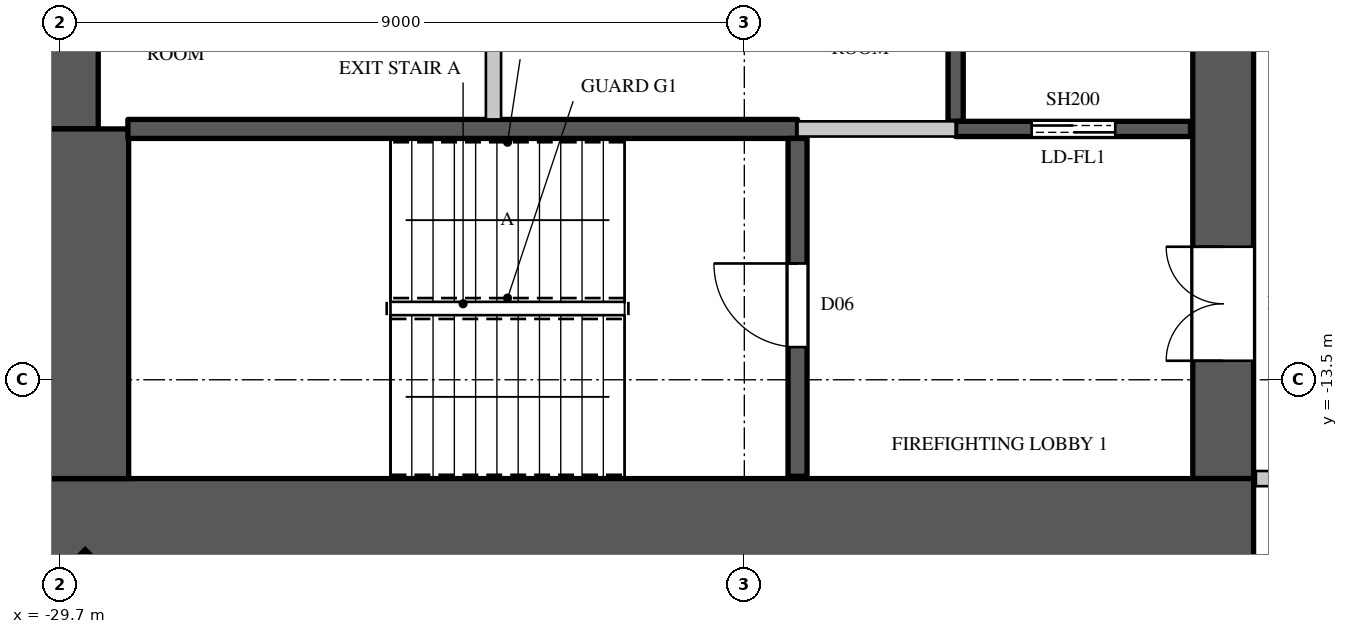
"""IFC4 building model, lengths in metres.
Left out: names, types, materials, properties, quantities, classifications, styles, units other than length and angle.
Written with IfcOpenShell. Run it as: python <this file> out.ifc"""

import sys

from ifc_helpers import new_model, si_unit, direction, frame, frame_2d, origin, origin_2d, place, context, subcontext, project, spatial, rectangle, extrude, element, fill, save


model = new_model("IFC4")
c1 = context("Model", 3, precision=1e-05, world=origin(), true_north=direction((0.0, 1.0)))
c2 = subcontext(c1, "Body", "Model", "MODEL_VIEW")
j1 = project(units=[si_unit("LENGTHUNIT", "METRE"), si_unit("PLANEANGLEUNIT", "RADIAN")], contexts=[c1])
p1 = place(None, origin())
s1 = spatial("IfcSite", under=j1, at=p1, CompositionType="ELEMENT")
p2 = place(p1, origin())
s2 = spatial("IfcBuilding", under=s1, at=p2, CompositionType="ELEMENT")
p3 = place(p2, frame((0.0, 0.0, 185.1)))
s3 = spatial("IfcBuildingStorey", under=s2, at=p3, CompositionType="ELEMENT", Elevation=185.1)
p4 = place(p3, frame((-29.443, -16.443, 0.0), z_axis=(0.0, 0.0, 1.0), x_axis=(0.707106781187, -0.707106781187, 0.0)))
e1 = element("IfcColumn", 1, at=p4, inside=s3, PredefinedType="COLUMN", context=c2, shape_type="SweptSolid", body=[
    extrude(rectangle(XDim=0.9, YDim=1.1, at=origin_2d()), origin(), (0.0, 0.0, 1.0), 4.1),
])
p5 = place(p3, frame((-30.0, -15.4, 0.0), z_axis=(0.0, 0.0, 1.0), x_axis=(1.0, 0.0, 0.0)))
e2 = element("IfcWall", 2, at=p5, inside=s3, PredefinedType="SHEAR", context=c2, shape_type="SweptSolid", body=[
    extrude(rectangle(XDim=16.0, YDim=1.2, at=frame_2d((8.0, 0.0))), origin(), (0.0, 0.0, 1.0), 4.1),
])
p6 = place(p3, frame((-14.4, -14.8, 0.0), z_axis=(0.0, 0.0, 1.0), x_axis=(0.0, 1.0, 0.0)))
e3 = element("IfcWall", 3, at=p6, inside=s3, PredefinedType="SHEAR", context=c2, shape_type="SweptSolid", body=[
    extrude(rectangle(XDim=29.6, YDim=0.8, at=frame_2d((14.8, 0.0))), origin(), (0.0, 0.0, 1.0), 4.1),
])
p7 = place(p6, frame((1.55, 0.0, 0.0)))
e4 = element("IfcOpeningElement", 4, at=p7, cuts=e3, PredefinedType="OPENING", context=c2, shape_type="SweptSolid", body=[
    extrude(rectangle(XDim=1.5, YDim=2.4, at=frame_2d((0.75, 1.2))), frame((0.0, 0.41, 0.0), z_axis=(0.0, -1.0, 0.0), x_axis=(1.0, 0.0, 0.0)), (0.0, 0.0, 1.0), 0.82),
])
p8 = place(p6, frame((26.55, 0.0, 0.0)))
e5 = element("IfcOpeningElement", 5, at=p8, cuts=e3, PredefinedType="OPENING", context=c2, shape_type="SweptSolid", body=[
    extrude(rectangle(XDim=1.5, YDim=2.4, at=frame_2d((0.75, 1.2))), frame((0.0, 0.41, 0.0), z_axis=(0.0, -1.0, 0.0), x_axis=(1.0, 0.0, 0.0)), (0.0, 0.0, 1.0), 0.82),
])
p9 = place(p6, frame((8.45, 0.0, 0.0)))
e6 = element("IfcOpeningElement", 6, at=p9, cuts=e3, PredefinedType="OPENING", context=c2, shape_type="SweptSolid", body=[
    extrude(rectangle(XDim=1.5, YDim=2.4, at=frame_2d((0.75, 1.2))), frame((0.0, 0.41, 0.0), z_axis=(0.0, -1.0, 0.0), x_axis=(1.0, 0.0, 0.0)), (0.0, 0.0, 1.0), 0.82),
])
p10 = place(p6, frame((19.65, 0.0, 0.0)))
e7 = element("IfcOpeningElement", 7, at=p10, cuts=e3, PredefinedType="OPENING", context=c2, shape_type="SweptSolid", body=[
    extrude(rectangle(XDim=1.5, YDim=2.4, at=frame_2d((0.75, 1.2))), frame((0.0, 0.41, 0.0), z_axis=(0.0, -1.0, 0.0), x_axis=(1.0, 0.0, 0.0)), (0.0, 0.0, 1.0), 0.82),
])
p11 = place(p6, frame((14.5, 0.0, 0.0)))
e8 = element("IfcOpeningElement", 8, at=p11, cuts=e3, PredefinedType="OPENING", context=c2, shape_type="SweptSolid", body=[
    extrude(rectangle(XDim=0.6, YDim=2.0, at=frame_2d((0.3, 1.0))), frame((0.0, 0.41, 0.0), z_axis=(0.0, -1.0, 0.0), x_axis=(1.0, 0.0, 0.0)), (0.0, 0.0, 1.0), 0.82),
])
p12 = place(p3, frame((-29.6, -10.2, 0.0), z_axis=(0.0, 0.0, 1.0), x_axis=(0.0, 1.0, 0.0)))
e9 = element("IfcWall", 9, at=p12, inside=s3, PredefinedType="SHEAR", context=c2, shape_type="SweptSolid", body=[
    extrude(rectangle(XDim=20.4, YDim=0.8, at=frame_2d((10.2, 0.0))), origin(), (0.0, 0.0, 1.0), 4.1),
])
p13 = place(p3, frame((-29.4, -14.8, 0.0), z_axis=(0.0, 0.0, 1.0), x_axis=(0.0, 1.0, 0.0)))
e10 = element("IfcWall", 10, at=p13, inside=s3, PredefinedType="SHEAR", context=c2, shape_type="SweptSolid", body=[
    extrude(rectangle(XDim=4.6, YDim=1.2, at=frame_2d((2.3, 0.0))), origin(), (0.0, 0.0, 1.0), 4.1),
])
p14 = place(p3, frame((-13.97, -14.8, 0.0), z_axis=(0.0, 0.0, 1.0), x_axis=(1.0, 0.0, 0.0)))
e11 = element("IfcWall", 11, at=p14, inside=s3, PredefinedType="PARTITIONING", context=c2, shape_type="SweptSolid", body=[
    extrude(rectangle(XDim=2.87, YDim=0.2, at=frame_2d((1.435, 0.0))), origin(), (0.0, 0.0, 1.0), 3.8),
])
p15 = place(p3, frame((-24.0, -10.075, 0.0), z_axis=(0.0, 0.0, 1.0), x_axis=(0.0, 1.0, 0.0)))
e12 = element("IfcWall", 12, at=p15, inside=s3, PredefinedType="PARTITIONING", context=c2, shape_type="SweptSolid", body=[
    extrude(rectangle(XDim=2.575, YDim=0.2, at=frame_2d((1.288, 0.0))), origin(), (0.0, 0.0, 1.0), 3.8),
])
p16 = place(p3, frame((-20.0, -10.2, 0.0), z_axis=(0.0, 0.0, 1.0), x_axis=(1.0, 0.0, 0.0)))
e13 = element("IfcWall", 13, at=p16, inside=s3, PredefinedType="PARTITIONING", context=c2, shape_type="SweptSolid", body=[
    extrude(rectangle(XDim=2.08, YDim=0.2, at=frame_2d((1.04, 0.0))), origin(), (0.0, 0.0, 1.0), 3.8),
])
p17 = place(p3, frame((-17.92, -10.1, 0.0), z_axis=(0.0, 0.0, 1.0), x_axis=(0.0, 1.0, 0.0)))
e14 = element("IfcWall", 14, at=p17, inside=s3, PredefinedType="SHEAR", context=c2, shape_type="SweptSolid", body=[
    extrude(rectangle(XDim=2.6, YDim=0.2, at=frame_2d((1.3, 0.0))), origin(), (0.0, 0.0, 1.0), 3.8),
])
p18 = place(p3, frame((-17.92, -10.2, 0.0), z_axis=(0.0, 0.0, 1.0), x_axis=(1.0, 0.0, 0.0)))
e15 = element("IfcWall", 15, at=p18, inside=s3, PredefinedType="SHEAR", context=c2, shape_type="SweptSolid", body=[
    extrude(rectangle(XDim=3.09, YDim=0.2, at=frame_2d((1.545, 0.0))), origin(), (0.0, 0.0, 1.0), 3.8),
])
p19 = place(p18, frame((1.0, 0.0, 0.0)))
e16 = element("IfcOpeningElement", 16, at=p19, cuts=e15, PredefinedType="OPENING", context=c2, shape_type="SweptSolid", body=[
    extrude(rectangle(XDim=1.1, YDim=2.2, at=frame_2d((0.55, 1.1))), frame((0.0, 0.11, 0.0), z_axis=(0.0, -1.0, 0.0), x_axis=(1.0, 0.0, 0.0)), (0.0, 0.0, 1.0), 0.22),
])
p20 = place(p3, frame((-28.81, -10.2, 0.0), z_axis=(0.0, 0.0, 1.0), x_axis=(1.0, 0.0, 0.0)))
e17 = element("IfcWall", 17, at=p20, inside=s3, PredefinedType="SHEAR", context=c2, shape_type="SweptSolid", body=[
    extrude(rectangle(XDim=8.81, YDim=0.25, at=frame_2d((4.405, 0.0))), origin(), (0.0, 0.0, 1.0), 3.8),
])
p21 = place(p3, frame((-20.0, -14.77, 0.0), z_axis=(0.0, 0.0, 1.0), x_axis=(0.0, 1.0, 0.0)))
e18 = element("IfcWall", 18, at=p21, inside=s3, PredefinedType="SHEAR", context=c2, shape_type="SweptSolid", body=[
    extrude(rectangle(XDim=4.445, YDim=0.25, at=frame_2d((2.223, 0.0))), origin(), (0.0, 0.0, 1.0), 3.8),
])
p22 = place(p21, frame((1.7, 0.0, 0.0)))
e19 = element("IfcOpeningElement", 19, at=p22, cuts=e18, PredefinedType="OPENING", context=c2, shape_type="SweptSolid", body=[
    extrude(rectangle(XDim=1.1, YDim=2.2, at=frame_2d((0.55, 1.1))), frame((0.0, 0.135, 0.0), z_axis=(0.0, -1.0, 0.0), x_axis=(1.0, 0.0, 0.0)), (0.0, 0.0, 1.0), 0.27),
])
p23 = place(p22, origin())
e20 = element("IfcDoor", 20, at=p23, inside=s3, OperationType="SINGLE_SWING_RIGHT", PredefinedType="DOOR", context=c2, shape_type="SweptSolid", body=[
    extrude(rectangle(XDim=1.1, YDim=2.2, at=frame_2d((0.55, 1.1))), frame((0.0, 0.025, 0.0), z_axis=(0.0, -1.0, 0.0), x_axis=(1.0, 0.0, 0.0)), (0.0, 0.0, 1.0), 0.05),
])
fill(e19, e20)
p24 = place(p19, origin())
e21 = element("IfcDoor", 21, at=p24, inside=s3, OperationType="DOUBLE_DOOR_SLIDING", PredefinedType="DOOR", context=c2, shape_type="SweptSolid", body=[
    extrude(rectangle(XDim=1.1, YDim=2.2, at=frame_2d((0.55, 1.1))), frame((0.0, 0.025, 0.0), z_axis=(0.0, -1.0, 0.0), x_axis=(1.0, 0.0, 0.0)), (0.0, 0.0, 1.0), 0.05),
])
fill(e16, e21)
p25 = place(p7, origin())
e22 = element("IfcDoor", 22, at=p25, inside=s3, OperationType="DOUBLE_DOOR_SINGLE_SWING", PredefinedType="DOOR", context=c2, shape_type="SweptSolid", body=[
    extrude(rectangle(XDim=1.5, YDim=2.4, at=frame_2d((0.75, 1.2))), frame((0.0, 0.395, 0.0), z_axis=(0.0, -1.0, 0.0), x_axis=(1.0, 0.0, 0.0)), (0.0, 0.0, 1.0), 0.05),
])
fill(e4, e22)
save(model, sys.argv[1])
